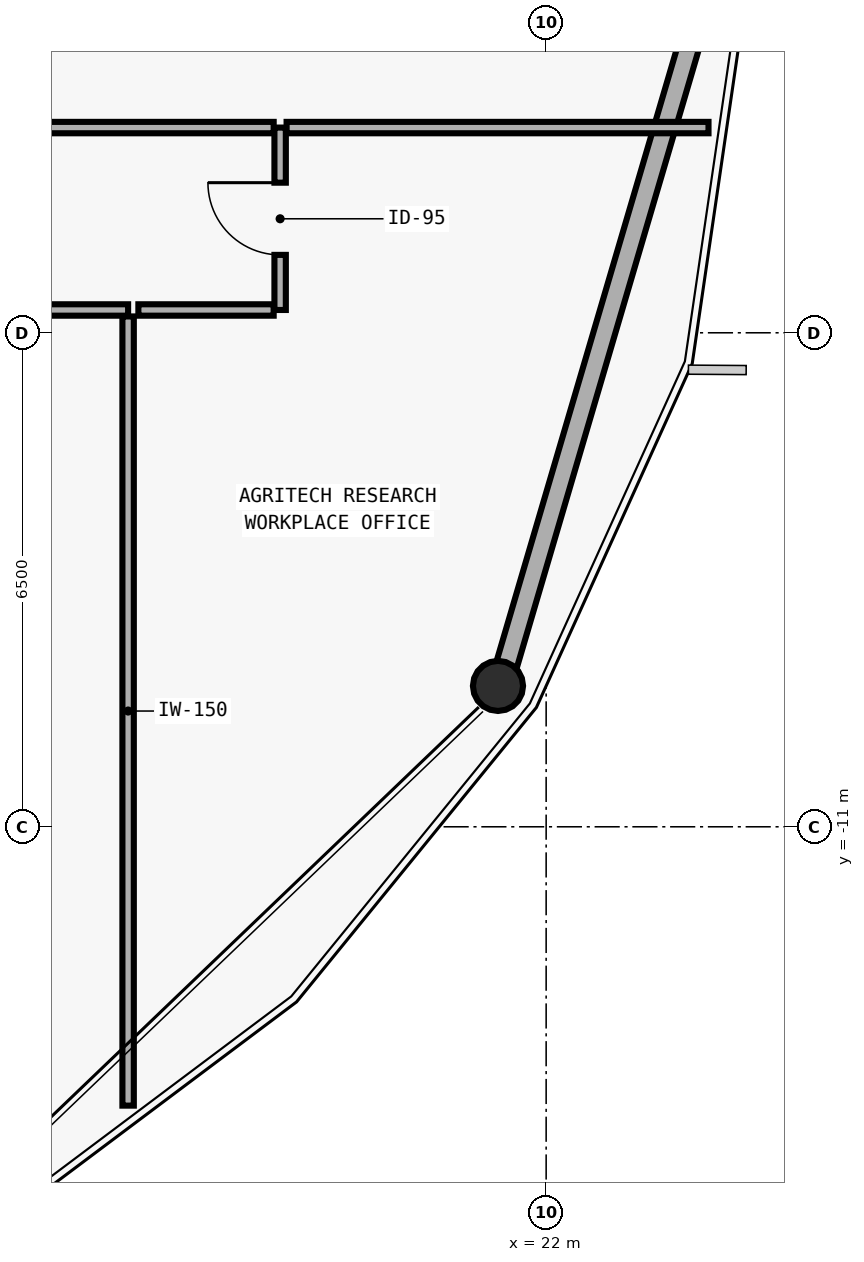
"""IFC4 building model, lengths in metres.
Left out: names, types, materials, properties, quantities, classifications, styles, units other than length and angle.
Written with IfcOpenShell. Run it as: python <this file> out.ifc"""

import sys

from ifc_helpers import new_model, si_unit, direction, frame, frame_2d, origin, origin_2d, place, context, subcontext, project, spatial, rectangle, hollow_circle, extrude, element, fill, save


model = new_model("IFC4")
c1 = context("Model", 3, precision=1e-05, world=origin(), true_north=direction((0.0, 1.0)))
c2 = subcontext(c1, "Body", "Model", "MODEL_VIEW")
j1 = project(units=[si_unit("LENGTHUNIT", "METRE"), si_unit("PLANEANGLEUNIT", "RADIAN")], contexts=[c1])
p1 = place(None, origin())
s1 = spatial("IfcSite", under=j1, at=p1, CompositionType="ELEMENT")
p2 = place(p1, origin())
s2 = spatial("IfcBuilding", under=s1, at=p2, CompositionType="ELEMENT")
p3 = place(p2, frame((0.0, 0.0, 207.6)))
s3 = spatial("IfcBuildingStorey", under=s2, at=p3, CompositionType="ELEMENT", Elevation=207.6)
p4 = place(p3, frame((21.396, -9.155, 0.0), z_axis=(-0.016251167856, 0.004779755252, 0.999856516448), x_axis=(-0.282166323992, -0.959365501571, 0.0)))
e1 = element("IfcColumn", 1, at=p4, inside=s3, PredefinedType="COLUMN", context=c2, shape_type="SweptSolid", body=[
    extrude(hollow_circle(Radius=0.33, WallThickness=0.025, at=origin_2d()), origin(), (0.0, 0.0, 1.0), 3.575),
])
p5 = place(p3, frame((24.01, -0.273, 0.0), z_axis=(0.0, 0.0, 1.0), x_axis=(-0.282359283475, -0.959308727697, 0.0)))
e2 = element("IfcWall", 2, at=p5, inside=s3, PredefinedType="SOLIDWALL", context=c2, shape_type="SweptSolid", body=[
    extrude(rectangle(XDim=8.973, YDim=0.28, at=frame_2d((4.487, 0.0))), origin(), (0.0, 0.0, 1.0), 2.93),
])
p6 = place(p3, frame((10.8, -4.2, 0.0), z_axis=(0.0, 0.0, 1.0), x_axis=(1.0, 0.0, 0.0)))
e3 = element("IfcWall", 3, at=p6, inside=s3, PredefinedType="PARTITIONING", context=c2, shape_type="SweptSolid", body=[
    extrude(rectangle(XDim=5.7, YDim=0.15, at=frame_2d((2.85, 0.0))), origin(), (0.0, 0.0, 1.0), 3.36),
])
p7 = place(p6, frame((2.375, 0.0, 0.0)))
e4 = element("IfcOpeningElement", 4, at=p7, cuts=e3, PredefinedType="OPENING", context=c2, shape_type="SweptSolid", body=[
    extrude(rectangle(XDim=0.95, YDim=2.1, at=frame_2d((0.475, 1.05))), frame((0.0, 0.085, 0.0), z_axis=(0.0, -1.0, 0.0), x_axis=(1.0, 0.0, 0.0)), (0.0, 0.0, 1.0), 0.17),
])
p8 = place(p3, frame((18.5, -4.2, 0.0), z_axis=(0.0, 0.0, 1.0), x_axis=(0.0, 1.0, 0.0)))
e5 = element("IfcWall", 5, at=p8, inside=s3, PredefinedType="PARTITIONING", context=c2, shape_type="SweptSolid", body=[
    extrude(rectangle(XDim=2.4, YDim=0.15, at=frame_2d((1.2, 0.0))), origin(), (0.0, 0.0, 1.0), 3.36),
])
p9 = place(p8, frame((0.725, 0.0, 0.0)))
e6 = element("IfcOpeningElement", 6, at=p9, cuts=e5, PredefinedType="OPENING", context=c2, shape_type="SweptSolid", body=[
    extrude(rectangle(XDim=0.95, YDim=2.1, at=frame_2d((0.475, 1.05))), frame((0.0, 0.085, 0.0), z_axis=(0.0, -1.0, 0.0), x_axis=(1.0, 0.0, 0.0)), (0.0, 0.0, 1.0), 0.17),
])
p10 = place(p3, frame((16.5, -4.285, 0.0), z_axis=(0.0, 0.0, 1.0), x_axis=(0.0, -1.0, 0.0)))
e7 = element("IfcWall", 7, at=p10, inside=s3, PredefinedType="PARTITIONING", context=c2, shape_type="SweptSolid", body=[
    extrude(rectangle(XDim=10.384, YDim=0.15, at=frame_2d((5.192, 0.0))), origin(), (0.0, 0.0, 1.0), 3.36),
])
p11 = place(p3, frame((16.635, -4.2, 0.0), z_axis=(0.0, 0.0, 1.0), x_axis=(1.0, 0.0, 0.0)))
e8 = element("IfcWall", 8, at=p11, inside=s3, PredefinedType="PARTITIONING", context=c2, shape_type="SweptSolid", body=[
    extrude(rectangle(XDim=1.78, YDim=0.15, at=frame_2d((0.89, 0.0))), origin(), (0.0, 0.0, 1.0), 3.36),
])
p12 = place(p3, frame((18.585, -1.8, 0.0), z_axis=(0.0, 0.0, 1.0), x_axis=(1.0, 0.0, 0.0)))
e9 = element("IfcWall", 9, at=p12, inside=s3, PredefinedType="PARTITIONING", context=c2, shape_type="SweptSolid", body=[
    extrude(rectangle(XDim=5.551, YDim=0.15, at=frame_2d((2.775, 0.0))), origin(), (0.0, 0.0, 1.0), 3.36),
])
p13 = place(p3, frame((18.415, -1.8, 0.0), z_axis=(0.0, 0.0, 1.0), x_axis=(-1.0, 0.0, 0.0)))
e10 = element("IfcWall", 10, at=p13, inside=s3, PredefinedType="PARTITIONING", context=c2, shape_type="SweptSolid", body=[
    extrude(rectangle(XDim=7.455, YDim=0.15, at=frame_2d((3.728, 0.0))), origin(), (0.0, 0.0, 1.0), 3.36),
])
p14 = place(p9, origin())
e11 = element("IfcDoor", 11, at=p14, inside=s3, OperationType="SINGLE_SWING_RIGHT", PredefinedType="DOOR", context=c2, shape_type="SweptSolid", body=[
    extrude(rectangle(XDim=0.95, YDim=2.1, at=frame_2d((0.475, 1.05))), frame((0.0, 0.025, 0.0), z_axis=(0.0, -1.0, 0.0), x_axis=(1.0, 0.0, 0.0)), (0.0, 0.0, 1.0), 0.05),
])
fill(e6, e11)
save(model, sys.argv[1])
